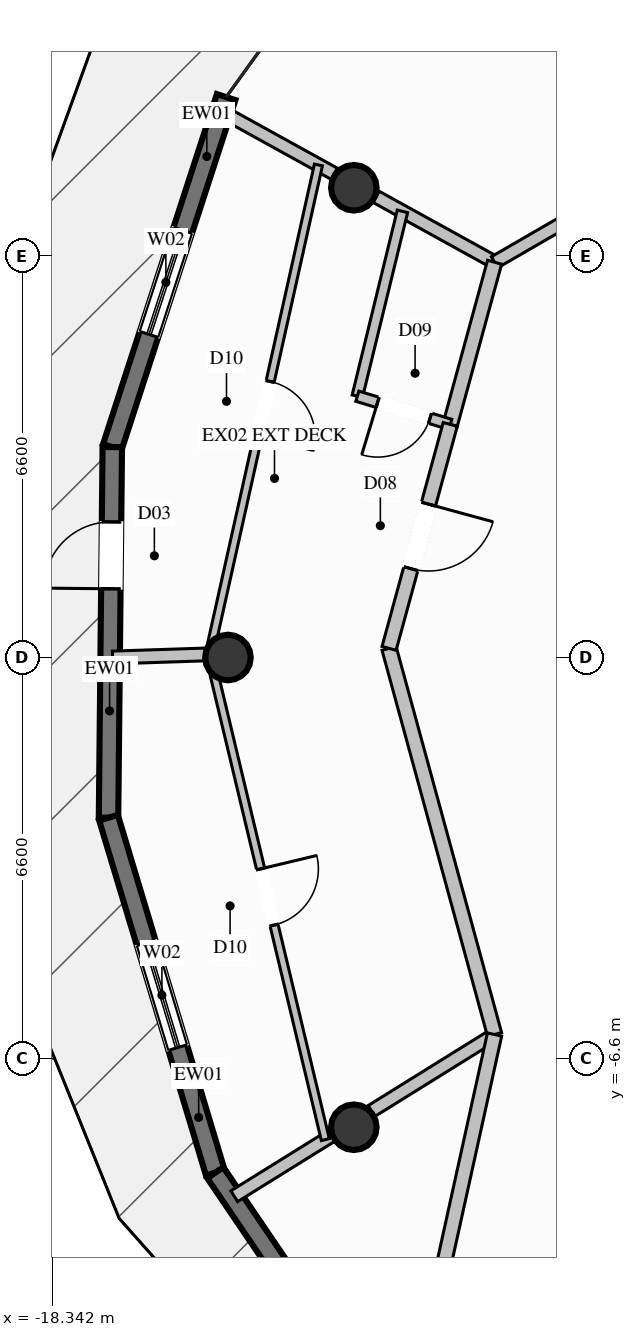
"""IFC4 building model, lengths in metres.
Left out: names, types, materials, properties, quantities, classifications, styles, units other than length and angle.
Written with IfcOpenShell. Run it as: python <this file> out.ifc"""

import sys

from ifc_helpers import new_model, si_unit, direction, frame, frame_2d, origin, origin_2d, place, context, subcontext, project, spatial, rectangle, circle, extrude, element, fill, save


model = new_model("IFC4")
c1 = context("Model", 3, precision=1e-05, world=origin(), true_north=direction((0.0, 1.0)))
c2 = subcontext(c1, "Body", "Model", "MODEL_VIEW")
j1 = project(units=[si_unit("LENGTHUNIT", "METRE"), si_unit("PLANEANGLEUNIT", "RADIAN")], contexts=[c1])
p1 = place(None, origin())
s1 = spatial("IfcSite", under=j1, at=p1, CompositionType="ELEMENT")
p2 = place(p1, origin())
s2 = spatial("IfcBuilding", under=s1, at=p2, CompositionType="ELEMENT")
p3 = place(p2, frame((0.0, 0.0, 254.4)))
s3 = spatial("IfcBuildingStorey", under=s2, at=p3, CompositionType="ELEMENT", Elevation=254.4)
for number, where, z_axis, x_axis in (
    (1, (-13.38, 7.725, 0.0), (0.0, 0.0, 1.0), (1.0, 0.0, 0.0)),
    (2, (-15.45, 0.0, 0.0), (0.0, 0.0, 1.0), (1.0, 0.0, 0.0)),
    (3, (-13.38, -7.725, 0.0), (0.0, 0.0, 1.0), (1.0, 0.0, 0.0)),
):
    element("IfcColumn", number, at=place(p3, frame(where, z_axis=z_axis, x_axis=x_axis)), inside=s3, PredefinedType="COLUMN", context=c2, shape_type="SweptSolid", body=[
        extrude(circle(Radius=0.375, at=origin_2d()), origin(), (0.0, 0.0, 1.0), 3.8),
    ])
p4 = place(p3, frame((-17.352, 3.46, 0.0), z_axis=(0.0, 0.0, 1.0), x_axis=(0.30928580051, 0.950969133885, 0.0)))
e4 = element("IfcWall", 4, at=p4, inside=s3, PredefinedType="SOLIDWALL", context=c2, shape_type="SweptSolid", body=[
    extrude(rectangle(XDim=6.053, YDim=0.32, at=frame_2d((3.026, 0.0))), origin(), (0.0, 0.0, 1.0), 3.57),
])
p5 = place(p4, frame((1.949, 0.0, 0.35)))
e5 = element("IfcOpeningElement", 5, at=p5, cuts=e4, PredefinedType="OPENING", context=c2, shape_type="SweptSolid", body=[
    extrude(rectangle(XDim=1.8, YDim=2.6, at=frame_2d((0.9, 1.3))), frame((0.0, 0.17, 0.0), z_axis=(0.0, -1.0, 0.0), x_axis=(1.0, 0.0, 0.0)), (0.0, 0.0, 1.0), 0.34),
])
p6 = place(p3, frame((-17.414, -2.635, 0.0), z_axis=(0.0, 0.0, 1.0), x_axis=(0.010173717388, 0.999948246398, 0.0)))
e6 = element("IfcWall", 6, at=p6, inside=s3, PredefinedType="SOLIDWALL", context=c2, shape_type="SweptSolid", body=[
    extrude(rectangle(XDim=6.095, YDim=0.32, at=frame_2d((3.048, 0.0))), origin(), (0.0, 0.0, 1.0), 3.57),
])
p7 = place(p6, frame((3.765, 0.0, 0.0)))
e7 = element("IfcOpeningElement", 7, at=p7, cuts=e6, PredefinedType="OPENING", context=c2, shape_type="SweptSolid", body=[
    extrude(rectangle(XDim=1.1, YDim=2.2, at=frame_2d((0.55, 1.1))), frame((0.0, 0.17, 0.0), z_axis=(0.0, -1.0, 0.0), x_axis=(1.0, 0.0, 0.0)), (0.0, 0.0, 1.0), 0.34),
])
p8 = place(p3, frame((-15.658, -8.472, 0.0), z_axis=(0.0, 0.0, 1.0), x_axis=(-0.288104770088, 0.957598893824, 0.0)))
e8 = element("IfcWall", 8, at=p8, inside=s3, PredefinedType="SOLIDWALL", context=c2, shape_type="SweptSolid", body=[
    extrude(rectangle(XDim=6.095, YDim=0.32, at=frame_2d((3.048, 0.0))), origin(), (0.0, 0.0, 1.0), 3.57),
])
p9 = place(p8, frame((2.148, 0.0, 0.35)))
e9 = element("IfcOpeningElement", 9, at=p9, cuts=e8, PredefinedType="OPENING", context=c2, shape_type="SweptSolid", body=[
    extrude(rectangle(XDim=1.8, YDim=2.6, at=frame_2d((0.9, 1.3))), frame((0.0, 0.17, 0.0), z_axis=(0.0, -1.0, 0.0), x_axis=(1.0, 0.0, 0.0)), (0.0, 0.0, 1.0), 0.34),
])
p10 = place(p3, frame((-12.257, -13.48, 0.0), z_axis=(0.0, 0.0, 1.0), x_axis=(-0.561790347822, 0.827279641412, 0.0)))
e10 = element("IfcWall", 10, at=p10, inside=s3, PredefinedType="SOLIDWALL", context=c2, shape_type="SweptSolid", body=[
    extrude(rectangle(XDim=6.054, YDim=0.32, at=frame_2d((3.027, 0.0))), origin(), (0.0, 0.0, 1.0), 3.57),
])
p11 = place(p10, frame((1.829, 0.0, 0.35)))
e11 = element("IfcOpeningElement", 11, at=p11, cuts=e10, PredefinedType="OPENING", context=c2, shape_type="SweptSolid", body=[
    extrude(rectangle(XDim=1.8, YDim=2.6, at=frame_2d((0.9, 1.3))), frame((0.0, 0.17, 0.0), z_axis=(0.0, -1.0, 0.0), x_axis=(1.0, 0.0, 0.0)), (0.0, 0.0, 1.0), 0.34),
])
p12 = place(p3, frame((-11.065, 6.5, 0.0), z_axis=(0.0, 0.0, 1.0), x_axis=(-0.875457695042, 0.483294759119, 0.0)))
e12 = element("IfcWall", 12, at=p12, inside=s3, PredefinedType="PARTITIONING", context=c2, shape_type="SweptSolid", body=[
    extrude(rectangle(XDim=2.226, YDim=0.21, at=frame_2d((1.113, 0.0))), origin(), (0.0, 0.0, 1.0), 3.011),
])
p13 = place(p3, frame((-13.701, 7.955, 0.0), z_axis=(0.0, 0.0, 1.0), x_axis=(-0.875344799611, 0.483499205577, 0.0)))
e13 = element("IfcWall", 13, at=p13, inside=s3, PredefinedType="PARTITIONING", context=c2, shape_type="SweptSolid", body=[
    extrude(rectangle(XDim=2.08, YDim=0.21, at=frame_2d((1.04, 0.0))), origin(), (0.0, 0.0, 1.0), 3.57),
])
p14 = place(p3, frame((-11.065, -6.2, 0.0), z_axis=(0.0, 0.0, 1.0), x_axis=(-0.849325046487, -0.527870216445, 0.0)))
e14 = element("IfcWall", 14, at=p14, inside=s3, PredefinedType="PARTITIONING", context=c2, shape_type="SweptSolid", body=[
    extrude(rectangle(XDim=2.383, YDim=0.21, at=frame_2d((1.192, 0.0))), origin(), (0.0, 0.0, 1.0), 3.011),
])
p15 = place(p3, frame((-13.748, -7.867, 0.0), z_axis=(0.0, 0.0, 1.0), x_axis=(-0.849315201444, -0.527886056451, 0.0)))
e15 = element("IfcWall", 15, at=p15, inside=s3, PredefinedType="PARTITIONING", context=c2, shape_type="SweptSolid", body=[
    extrude(rectangle(XDim=1.881, YDim=0.21, at=frame_2d((0.941, 0.0))), origin(), (0.0, 0.0, 1.0), 3.57),
])
p16 = place(p3, frame((-11.065, 6.5, 0.0), z_axis=(0.0, 0.0, 1.0), x_axis=(0.865506757898, 0.50089724698, 0.0)))
e16 = element("IfcWall", 16, at=p16, inside=s3, PredefinedType="PARTITIONING", context=c2, shape_type="SweptSolid", body=[
    extrude(rectangle(XDim=4.292, YDim=0.21, at=frame_2d((2.146, 0.0))), origin(), (0.0, 0.0, 1.0), 3.57),
])
p17 = place(p3, frame((-11.065, 6.5, 0.0), z_axis=(0.0, 0.0, 1.0), x_axis=(-0.263670269996, -0.964612869871, 0.0)))
e17 = element("IfcWall", 17, at=p17, inside=s3, PredefinedType="PARTITIONING", context=c2, shape_type="SweptSolid", body=[
    extrude(rectangle(XDim=2.765, YDim=0.24, at=frame_2d((1.382, 0.0))), origin(), (0.0, 0.0, 1.0), 3.57),
])
p18 = place(p3, frame((-12.58, 7.337, 0.0), z_axis=(0.0, 0.0, 1.0), x_axis=(-0.237116037117, -0.971481335354, 0.0)))
e18 = element("IfcWall", 18, at=p18, inside=s3, PredefinedType="PLUMBINGWALL", context=c2, shape_type="SweptSolid", body=[
    extrude(rectangle(XDim=3.129, YDim=0.175, at=frame_2d((1.564, 0.0))), origin(), (0.0, 0.0, 1.0), 3.57),
])
p19 = place(p3, frame((-11.794, 3.833, 0.0), z_axis=(0.0, 0.0, 1.0), x_axis=(-0.956840351484, 0.290614077036, 0.0)))
e19 = element("IfcWall", 19, at=p19, inside=s3, PredefinedType="PLUMBINGWALL", context=c2, shape_type="SweptSolid", body=[
    extrude(rectangle(XDim=1.597, YDim=0.175, at=frame_2d((0.798, 0.0))), origin(), (0.0, 0.0, 1.0), 3.57),
])
p20 = place(p19, frame((0.348, 0.0, 0.0)))
e20 = element("IfcOpeningElement", 20, at=p20, cuts=e19, PredefinedType="OPENING", context=c2, shape_type="SweptSolid", body=[
    extrude(rectangle(XDim=0.9, YDim=2.1, at=frame_2d((0.45, 1.05))), frame((0.0, 0.098, 0.0), z_axis=(0.0, -1.0, 0.0), x_axis=(1.0, 0.0, 0.0)), (0.0, 0.0, 1.0), 0.195),
])
p21 = place(p3, frame((-15.756, 0.052, 0.0), z_axis=(0.0, 0.0, 1.0), x_axis=(-0.999466150083, -0.032671315219, 0.0)))
e21 = element("IfcWall", 21, at=p21, inside=s3, PredefinedType="PARTITIONING", context=c2, shape_type="SweptSolid", body=[
    extrude(rectangle(XDim=1.592, YDim=0.21, at=frame_2d((0.796, 0.0))), origin(), (0.0, 0.0, 1.0), 3.57),
])
p22 = place(p3, frame((-12.8, 0.15, 0.0), z_axis=(0.0, 0.0, 1.0), x_axis=(0.263588113382, -0.964635323054, 0.0)))
e22 = element("IfcWall", 22, at=p22, inside=s3, PredefinedType="PARTITIONING", context=c2, shape_type="SweptSolid", body=[
    extrude(rectangle(XDim=6.583, YDim=0.24, at=frame_2d((3.292, 0.0))), origin(), (0.0, 0.0, 1.0), 3.57),
])
p23 = place(p3, frame((-11.794, 3.833, 0.0), z_axis=(0.0, 0.0, 1.0), x_axis=(-0.263512359615, -0.964656019693, 0.0)))
e23 = element("IfcWall", 23, at=p23, inside=s3, PredefinedType="PARTITIONING", context=c2, shape_type="SweptSolid", body=[
    extrude(rectangle(XDim=3.818, YDim=0.24, at=frame_2d((1.909, 0.0))), origin(), (0.0, 0.0, 1.0), 3.57),
])
p24 = place(p23, frame((1.359, 0.0, 0.0)))
e24 = element("IfcOpeningElement", 24, at=p24, cuts=e23, PredefinedType="OPENING", context=c2, shape_type="SweptSolid", body=[
    extrude(rectangle(XDim=1.1, YDim=2.3, at=frame_2d((0.55, 1.15))), frame((0.0, 0.13, 0.0), z_axis=(0.0, -1.0, 0.0), x_axis=(1.0, 0.0, 0.0)), (0.0, 0.0, 1.0), 0.26),
])
p25 = place(p3, frame((-13.962, 8.1, 0.0), z_axis=(0.0, 0.0, 1.0), x_axis=(-0.217591893781, -0.976039839228, 0.0)))
e25 = element("IfcWall", 25, at=p25, inside=s3, PredefinedType="PARTITIONING", context=c2, shape_type="SweptSolid", body=[
    extrude(rectangle(XDim=8.246, YDim=0.135, at=frame_2d((4.123, 0.0))), origin(), (0.0, 0.0, 1.0), 3.138),
])
p26 = place(p25, frame((3.648, 0.0, 0.0)))
e26 = element("IfcOpeningElement", 26, at=p26, cuts=e25, PredefinedType="OPENING", context=c2, shape_type="SweptSolid", body=[
    extrude(rectangle(XDim=0.95, YDim=2.1, at=frame_2d((0.475, 1.05))), frame((0.0, 0.078, 0.0), z_axis=(0.0, -1.0, 0.0), x_axis=(1.0, 0.0, 0.0)), (0.0, 0.0, 1.0), 0.155),
])
p27 = place(p3, frame((-15.756, 0.052, 0.0), z_axis=(0.0, 0.0, 1.0), x_axis=(0.232540176205, -0.972586791217, 0.0)))
e27 = element("IfcWall", 27, at=p27, inside=s3, PredefinedType="PARTITIONING", context=c2, shape_type="SweptSolid", body=[
    extrude(rectangle(XDim=8.206, YDim=0.135, at=frame_2d((4.103, 0.0))), origin(), (0.0, 0.0, 1.0), 3.138),
])
p28 = place(p27, frame((3.628, 0.0, 0.0)))
e28 = element("IfcOpeningElement", 28, at=p28, cuts=e27, PredefinedType="OPENING", context=c2, shape_type="SweptSolid", body=[
    extrude(rectangle(XDim=0.95, YDim=2.1, at=frame_2d((0.475, 1.05))), frame((0.0, 0.078, 0.0), z_axis=(0.0, -1.0, 0.0), x_axis=(1.0, 0.0, 0.0)), (0.0, 0.0, 1.0), 0.155),
])
p29 = place(p3, frame((-11.065, -6.2, 0.0), z_axis=(0.0, 0.0, 1.0), x_axis=(-0.215375028734, -0.976531411168, 0.0)))
e29 = element("IfcWall", 29, at=p29, inside=s3, PredefinedType="PARTITIONING", context=c2, shape_type="SweptSolid", body=[
    extrude(rectangle(XDim=5.735, YDim=0.24, at=frame_2d((2.867, 0.0))), origin(), (0.0, 0.0, 1.0), 3.57),
])
p30 = place(p5, origin())
e30 = element("IfcWindow", 30, at=p30, inside=s3, PartitioningType="SINGLE_PANEL", PredefinedType="WINDOW", context=c2, shape_type="SweptSolid", body=[
    extrude(rectangle(XDim=1.8, YDim=2.6, at=frame_2d((0.9, 1.3))), frame((0.0, 0.03, 0.0), z_axis=(0.0, -1.0, 0.0), x_axis=(1.0, 0.0, 0.0)), (0.0, 0.0, 1.0), 0.06),
])
fill(e5, e30)
p31 = place(p7, origin())
e31 = element("IfcDoor", 31, at=p31, inside=s3, OperationType="SINGLE_SWING_LEFT", PredefinedType="DOOR", context=c2, shape_type="SweptSolid", body=[
    extrude(rectangle(XDim=1.1, YDim=2.2, at=frame_2d((0.55, 1.1))), frame((0.0, 0.025, 0.0), z_axis=(0.0, -1.0, 0.0), x_axis=(1.0, 0.0, 0.0)), (0.0, 0.0, 1.0), 0.05),
])
fill(e7, e31)
p32 = place(p9, origin())
e32 = element("IfcWindow", 32, at=p32, inside=s3, PartitioningType="SINGLE_PANEL", PredefinedType="WINDOW", context=c2, shape_type="SweptSolid", body=[
    extrude(rectangle(XDim=1.8, YDim=2.6, at=frame_2d((0.9, 1.3))), frame((0.0, 0.03, 0.0), z_axis=(0.0, -1.0, 0.0), x_axis=(1.0, 0.0, 0.0)), (0.0, 0.0, 1.0), 0.06),
])
fill(e9, e32)
p33 = place(p20, origin())
e33 = element("IfcDoor", 33, at=p33, inside=s3, OperationType="SINGLE_SWING_RIGHT", PredefinedType="DOOR", context=c2, shape_type="SweptSolid", body=[
    extrude(rectangle(XDim=0.9, YDim=2.1, at=frame_2d((0.45, 1.05))), frame((0.0, 0.025, 0.0), z_axis=(0.0, -1.0, 0.0), x_axis=(1.0, 0.0, 0.0)), (0.0, 0.0, 1.0), 0.05),
])
fill(e20, e33)
p34 = place(p24, origin())
e34 = element("IfcDoor", 34, at=p34, inside=s3, OperationType="SINGLE_SWING_LEFT", PredefinedType="DOOR", context=c2, shape_type="SweptSolid", body=[
    extrude(rectangle(XDim=1.1, YDim=2.3, at=frame_2d((0.55, 1.15))), frame((0.0, 0.025, 0.0), z_axis=(0.0, -1.0, 0.0), x_axis=(1.0, 0.0, 0.0)), (0.0, 0.0, 1.0), 0.05),
])
fill(e24, e34)
p35 = place(p26, origin())
e35 = element("IfcDoor", 35, at=p35, inside=s3, OperationType="SINGLE_SWING_RIGHT", PredefinedType="DOOR", context=c2, shape_type="SweptSolid", body=[
    extrude(rectangle(XDim=0.95, YDim=2.1, at=frame_2d((0.475, 1.05))), frame((0.0, 0.025, 0.0), z_axis=(0.0, -1.0, 0.0), x_axis=(1.0, 0.0, 0.0)), (0.0, 0.0, 1.0), 0.05),
])
fill(e26, e35)
p36 = place(p28, origin())
e36 = element("IfcDoor", 36, at=p36, inside=s3, OperationType="SINGLE_SWING_LEFT", PredefinedType="DOOR", context=c2, shape_type="SweptSolid", body=[
    extrude(rectangle(XDim=0.95, YDim=2.1, at=frame_2d((0.475, 1.05))), frame((0.0, 0.025, 0.0), z_axis=(0.0, -1.0, 0.0), x_axis=(1.0, 0.0, 0.0)), (0.0, 0.0, 1.0), 0.05),
])
fill(e28, e36)
save(model, sys.argv[1])
